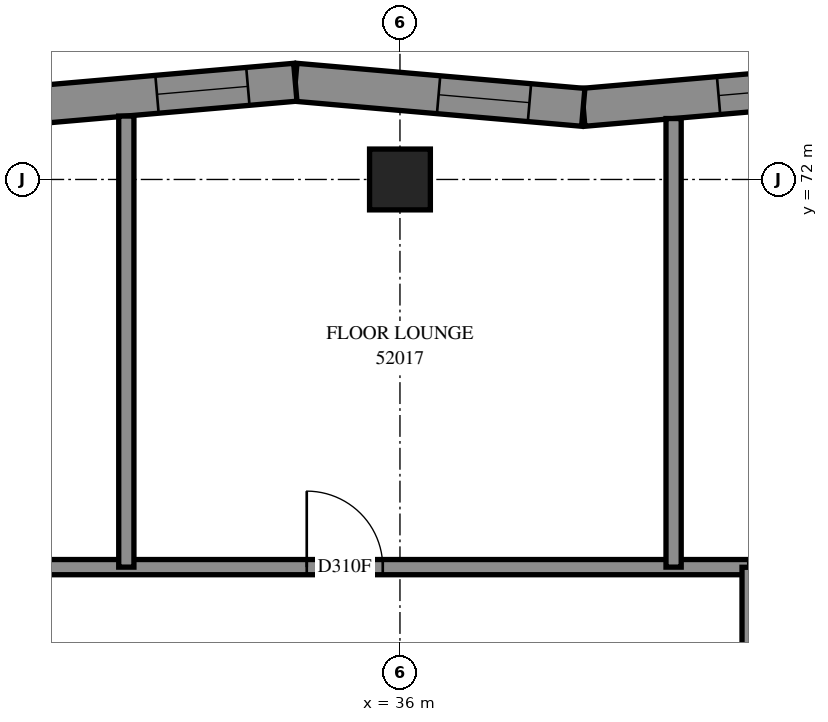
"""IFC4 building model, lengths in metres.
Left out: names, types, materials, properties, quantities, classifications, styles, units other than length and angle.
Written with IfcOpenShell. Run it as: python <this file> out.ifc"""

import sys

from ifc_helpers import new_model, si_unit, direction, frame, frame_2d, origin, origin_2d, place, context, subcontext, project, spatial, polyline, rectangle, outline, extrude, element, fill, save


model = new_model("IFC4")
c1 = context("Model", 3, precision=1e-05, world=origin(), true_north=direction((0.0, 1.0)))
c2 = subcontext(c1, "Body", "Model", "MODEL_VIEW")
j1 = project(units=[si_unit("LENGTHUNIT", "METRE"), si_unit("PLANEANGLEUNIT", "RADIAN")], contexts=[c1])
p1 = place(None, origin())
s1 = spatial("IfcSite", under=j1, at=p1, CompositionType="ELEMENT")
p2 = place(p1, origin())
s2 = spatial("IfcBuilding", under=s1, at=p2, CompositionType="ELEMENT")
p3 = place(p2, frame((0.0, 0.0, 193.0)))
s3 = spatial("IfcBuildingStorey", under=s2, at=p3, CompositionType="ELEMENT", Elevation=193.0)
p4 = place(p3, frame((36.0, 72.0, 0.0), z_axis=(0.0, 0.0, 1.0), x_axis=(1.0, 0.0, 0.0)))
e1 = element("IfcColumn", 1, at=p4, inside=s3, PredefinedType="COLUMN", context=c2, shape_type="SweptSolid", body=[
    extrude(rectangle(XDim=0.8, YDim=0.8, at=origin_2d()), origin(), (0.0, 0.0, 1.0), 3.1),
])
p5 = place(p3, frame((42.2, 73.279, 0.0), z_axis=(0.0, 0.0, 1.0), x_axis=(-0.9962273538, -0.0867816769, 0.0)))
e2 = element("IfcWall", 2, at=p5, inside=s3, PredefinedType="SOLIDWALL", context=c2, shape_type="SweptSolid", body=[
    extrude(outline(polyline([(-0.022, -0.25), (3.781, -0.25), (3.824, 0.25), (0.022, 0.25), (-0.022, -0.25)])), origin(), (0.0, 0.0, 1.0), 3.1),
])
p6 = place(p5, frame((0.816, 0.0, 0.45)))
e3 = element("IfcOpeningElement", 3, at=p6, cuts=e2, PredefinedType="OPENING", context=c2, shape_type="SweptSolid", body=[
    extrude(rectangle(XDim=1.2, YDim=2.5, at=frame_2d((0.6, 1.25))), frame((0.0, 0.26, 0.0), z_axis=(0.0, -1.0, 0.0), x_axis=(1.0, 0.0, 0.0)), (0.0, 0.0, 1.0), 0.52),
])
p7 = place(p3, frame((38.411, 72.949, 0.0), z_axis=(0.0, 0.0, 1.0), x_axis=(-0.9962271558, 0.0867839505, 0.0)))
e4 = element("IfcWall", 4, at=p7, inside=s3, PredefinedType="SOLIDWALL", context=c2, shape_type="SweptSolid", body=[
    extrude(outline(polyline([(0.022, -0.25), (3.824, -0.25), (3.781, 0.25), (-0.022, 0.25), (0.022, -0.25)])), origin(), (0.0, 0.0, 1.0), 3.1),
])
p8 = place(p7, frame((0.71, 0.0, 0.45)))
e5 = element("IfcOpeningElement", 5, at=p8, cuts=e4, PredefinedType="OPENING", context=c2, shape_type="SweptSolid", body=[
    extrude(rectangle(XDim=1.2, YDim=2.5, at=frame_2d((0.6, 1.25))), frame((0.0, 0.26, 0.0), z_axis=(0.0, -1.0, 0.0), x_axis=(1.0, 0.0, 0.0)), (0.0, 0.0, 1.0), 0.52),
])
p9 = place(p3, frame((34.623, 73.279, 0.0), z_axis=(0.0, 0.0, 1.0), x_axis=(-0.9962273538, -0.0867816769, 0.0)))
e6 = element("IfcWall", 6, at=p9, inside=s3, PredefinedType="SOLIDWALL", context=c2, shape_type="SweptSolid", body=[
    extrude(outline(polyline([(-0.022, -0.25), (3.781, -0.25), (3.824, 0.25), (0.022, 0.25), (-0.022, -0.25)])), origin(), (0.0, 0.0, 1.0), 3.1),
])
p10 = place(p9, frame((0.627, 0.0, 0.45)))
e7 = element("IfcOpeningElement", 7, at=p10, cuts=e6, PredefinedType="OPENING", context=c2, shape_type="SweptSolid", body=[
    extrude(rectangle(XDim=1.2, YDim=2.5, at=frame_2d((0.6, 1.25))), frame((0.0, 0.26, 0.0), z_axis=(0.0, -1.0, 0.0), x_axis=(1.0, 0.0, 0.0)), (0.0, 0.0, 1.0), 0.52),
])
p11 = place(p3, frame((21.602, 66.9, 0.0), z_axis=(0.0, 0.0, 1.0), x_axis=(1.0, 0.0, 0.0)))
e8 = element("IfcWall", 8, at=p11, inside=s3, PredefinedType="PARTITIONING", context=c2, shape_type="SweptSolid", body=[
    extrude(rectangle(XDim=18.998, YDim=0.2, at=frame_2d((9.499, 0.0))), origin(), (0.0, 0.0, 1.0), 3.1),
])
p12 = place(p11, frame((5.972, 0.0, 0.0)))
e9 = element("IfcOpeningElement", 9, at=p12, cuts=e8, PredefinedType="OPENING", context=c2, shape_type="SweptSolid", body=[
    extrude(rectangle(XDim=1.0, YDim=2.1, at=frame_2d((0.5, 1.05))), frame((0.0, 0.11, 0.0), z_axis=(0.0, -1.0, 0.0), x_axis=(1.0, 0.0, 0.0)), (0.0, 0.0, 1.0), 0.22),
])
p13 = place(p11, frame((13.172, 0.0, 0.0)))
e10 = element("IfcOpeningElement", 10, at=p13, cuts=e8, PredefinedType="OPENING", context=c2, shape_type="SweptSolid", body=[
    extrude(rectangle(XDim=1.0, YDim=2.1, at=frame_2d((0.5, 1.05))), frame((0.0, 0.11, 0.0), z_axis=(0.0, -1.0, 0.0), x_axis=(1.0, 0.0, 0.0)), (0.0, 0.0, 1.0), 0.22),
])
p14 = place(p3, frame((32.4, 66.9, 0.0), z_axis=(0.0, 0.0, 1.0), x_axis=(0.0, 1.0, 0.0)))
e11 = element("IfcWall", 11, at=p14, inside=s3, PredefinedType="PARTITIONING", context=c2, shape_type="SweptSolid", body=[
    extrude(rectangle(XDim=5.934, YDim=0.2, at=frame_2d((2.967, 0.0))), origin(), (0.0, 0.0, 1.0), 3.1),
])
p15 = place(p3, frame((39.6, 66.9, 0.0), z_axis=(0.0, 0.0, 1.0), x_axis=(0.0, 1.0, 0.0)))
e12 = element("IfcWall", 12, at=p15, inside=s3, PredefinedType="PARTITIONING", context=c2, shape_type="SweptSolid", body=[
    extrude(rectangle(XDim=5.902, YDim=0.2, at=frame_2d((2.951, 0.0))), origin(), (0.0, 0.0, 1.0), 3.1),
])
p16 = place(p3, frame((40.6, 62.202, 0.0), z_axis=(0.0, 0.0, 1.0), x_axis=(0.0, 1.0, 0.0)))
e13 = element("IfcWall", 13, at=p16, inside=s3, PredefinedType="PARTITIONING", context=c2, shape_type="SweptSolid", body=[
    extrude(rectangle(XDim=4.696, YDim=0.2, at=frame_2d((2.348, 0.0))), origin(), (0.0, 0.0, 1.0), 3.1),
])
p17 = place(p6, origin())
e14 = element("IfcWindow", 14, at=p17, inside=s3, PartitioningType="SINGLE_PANEL", PredefinedType="WINDOW", context=c2, shape_type="SweptSolid", body=[
    extrude(rectangle(XDim=1.2, YDim=2.5, at=frame_2d((0.6, 1.25))), frame((0.0, 0.18, 0.0), z_axis=(0.0, -1.0, 0.0), x_axis=(1.0, 0.0, 0.0)), (0.0, 0.0, 1.0), 0.06),
])
fill(e3, e14)
p18 = place(p8, origin())
e15 = element("IfcWindow", 15, at=p18, inside=s3, PartitioningType="SINGLE_PANEL", PredefinedType="WINDOW", context=c2, shape_type="SweptSolid", body=[
    extrude(rectangle(XDim=1.2, YDim=2.5, at=frame_2d((0.6, 1.25))), frame((0.0, 0.18, 0.0), z_axis=(0.0, -1.0, 0.0), x_axis=(1.0, 0.0, 0.0)), (0.0, 0.0, 1.0), 0.06),
])
fill(e5, e15)
p19 = place(p10, origin())
e16 = element("IfcWindow", 16, at=p19, inside=s3, PartitioningType="SINGLE_PANEL", PredefinedType="WINDOW", context=c2, shape_type="SweptSolid", body=[
    extrude(rectangle(XDim=1.2, YDim=2.5, at=frame_2d((0.6, 1.25))), frame((0.0, 0.18, 0.0), z_axis=(0.0, -1.0, 0.0), x_axis=(1.0, 0.0, 0.0)), (0.0, 0.0, 1.0), 0.06),
])
fill(e7, e16)
p20 = place(p13, origin())
e17 = element("IfcDoor", 17, at=p20, inside=s3, OperationType="SINGLE_SWING_LEFT", PredefinedType="DOOR", context=c2, shape_type="SweptSolid", body=[
    extrude(rectangle(XDim=1.0, YDim=2.1, at=frame_2d((0.5, 1.05))), frame((0.0, 0.025, 0.0), z_axis=(0.0, -1.0, 0.0), x_axis=(1.0, 0.0, 0.0)), (0.0, 0.0, 1.0), 0.05),
])
fill(e10, e17)
save(model, sys.argv[1])
